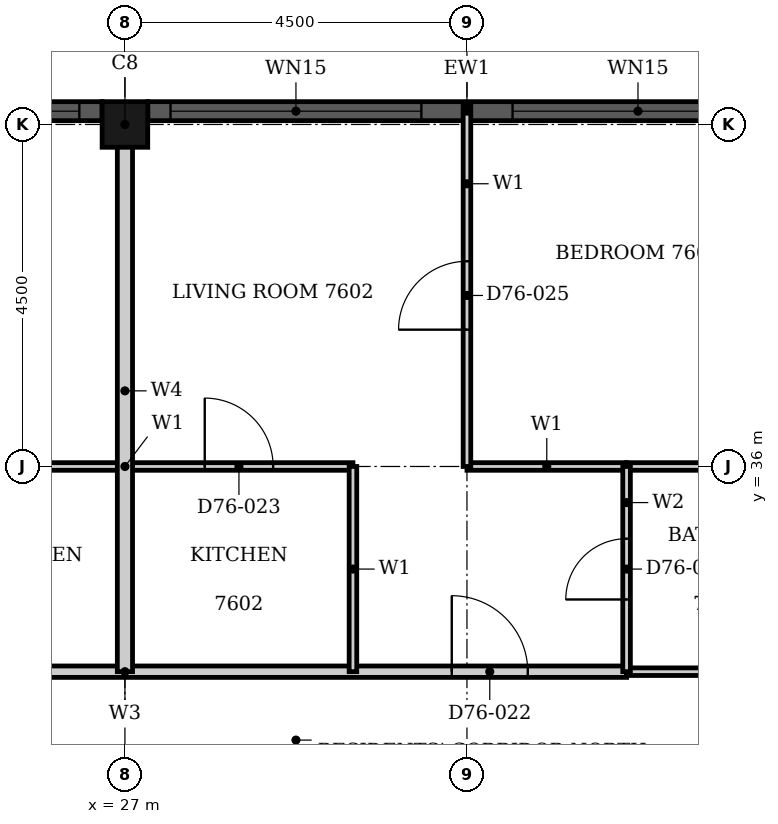
"""IFC4 building model, lengths in metres.
Left out: names, types, materials, properties, quantities, classifications, styles, units other than length and angle.
Written with IfcOpenShell. Run it as: python <this file> out.ifc"""

import sys

from ifc_helpers import new_model, si_unit, direction, frame, frame_2d, origin, origin_2d, place, context, subcontext, project, spatial, rectangle, hollow_rectangle, extrude, element, fill, save


model = new_model("IFC4")
c1 = context("Model", 3, precision=1e-05, world=origin(), true_north=direction((0.0, 1.0)))
c2 = subcontext(c1, "Body", "Model", "MODEL_VIEW")
j1 = project(units=[si_unit("LENGTHUNIT", "METRE"), si_unit("PLANEANGLEUNIT", "RADIAN")], contexts=[c1])
p1 = place(None, origin())
s1 = spatial("IfcSite", under=j1, at=p1, CompositionType="ELEMENT")
p2 = place(p1, origin())
s2 = spatial("IfcBuilding", under=s1, at=p2, CompositionType="ELEMENT")
p3 = place(p2, frame((0.0, 0.0, 298.2)))
s3 = spatial("IfcBuildingStorey", under=s2, at=p3, CompositionType="ELEMENT", Elevation=298.2)
p4 = place(p3, frame((27.0, 40.5, 0.0), z_axis=(0.0, 0.0, 1.0), x_axis=(1.0, 0.0, 0.0)))
e1 = element("IfcColumn", 1, at=p4, inside=s3, PredefinedType="COLUMN", context=c2, shape_type="SweptSolid", body=[
    extrude(hollow_rectangle(XDim=0.6, YDim=0.6, WallThickness=0.02, at=origin_2d()), origin(), (0.0, 0.0, 1.0), 3.7),
])
p5 = place(p3, frame((35.7, 40.675, 0.0), z_axis=(0.0, 0.0, 1.0), x_axis=(-1.0, 0.0, 0.0)))
e2 = element("IfcWall", 2, at=p5, inside=s3, PredefinedType="SOLIDWALL", context=c2, shape_type="SweptSolid", body=[
    extrude(rectangle(XDim=8.4, YDim=0.25, at=frame_2d((4.2, 0.0))), origin(), (0.0, 0.0, 1.0), 3.7),
])
p6 = place(p5, frame((0.3, 0.0, 0.45)))
e3 = element("IfcOpeningElement", 3, at=p6, cuts=e2, PredefinedType="OPENING", context=c2, shape_type="SweptSolid", body=[
    extrude(rectangle(XDim=3.3, YDim=2.3, at=frame_2d((1.65, 1.15))), frame((0.0, 0.135, 0.0), z_axis=(0.0, -1.0, 0.0), x_axis=(1.0, 0.0, 0.0)), (0.0, 0.0, 1.0), 0.27),
])
p7 = place(p5, frame((4.8, 0.0, 0.45)))
e4 = element("IfcOpeningElement", 4, at=p7, cuts=e2, PredefinedType="OPENING", context=c2, shape_type="SweptSolid", body=[
    extrude(rectangle(XDim=3.3, YDim=2.3, at=frame_2d((1.65, 1.15))), frame((0.0, 0.135, 0.0), z_axis=(0.0, -1.0, 0.0), x_axis=(1.0, 0.0, 0.0)), (0.0, 0.0, 1.0), 0.27),
])
p8 = place(p3, frame((26.7, 40.675, 0.0), z_axis=(0.0, 0.0, 1.0), x_axis=(-1.0, 0.0, 0.0)))
e5 = element("IfcWall", 5, at=p8, inside=s3, PredefinedType="SOLIDWALL", context=c2, shape_type="SweptSolid", body=[
    extrude(rectangle(XDim=8.4, YDim=0.25, at=frame_2d((4.2, 0.0))), origin(), (0.0, 0.0, 1.0), 3.7),
])
p9 = place(p8, frame((0.3, 0.0, 0.45)))
e6 = element("IfcOpeningElement", 6, at=p9, cuts=e5, PredefinedType="OPENING", context=c2, shape_type="SweptSolid", body=[
    extrude(rectangle(XDim=3.3, YDim=2.3, at=frame_2d((1.65, 1.15))), frame((0.0, 0.135, 0.0), z_axis=(0.0, -1.0, 0.0), x_axis=(1.0, 0.0, 0.0)), (0.0, 0.0, 1.0), 0.27),
])
p10 = place(p8, frame((4.8, 0.0, 0.45)))
e7 = element("IfcOpeningElement", 7, at=p10, cuts=e5, PredefinedType="OPENING", context=c2, shape_type="SweptSolid", body=[
    extrude(rectangle(XDim=3.3, YDim=2.3, at=frame_2d((1.65, 1.15))), frame((0.0, 0.135, 0.0), z_axis=(0.0, -1.0, 0.0), x_axis=(1.0, 0.0, 0.0)), (0.0, 0.0, 1.0), 0.27),
])
p11 = place(p3, frame((20.4, 33.3, 0.0), z_axis=(0.0, 0.0, 1.0), x_axis=(1.0, 0.0, 0.0)))
e8 = element("IfcWall", 8, at=p11, inside=s3, PredefinedType="PARTITIONING", context=c2, shape_type="SweptSolid", body=[
    extrude(rectangle(XDim=13.2, YDim=0.15, at=frame_2d((6.6, 0.0))), origin(), (0.0, 0.0, 1.0), 3.4),
])
p12 = place(p11, frame((1.3, 0.0, 0.0)))
e9 = element("IfcOpeningElement", 9, at=p12, cuts=e8, PredefinedType="OPENING", context=c2, shape_type="SweptSolid", body=[
    extrude(rectangle(XDim=1.0, YDim=2.2, at=frame_2d((0.5, 1.1))), frame((0.0, 0.085, 0.0), z_axis=(0.0, -1.0, 0.0), x_axis=(1.0, 0.0, 0.0)), (0.0, 0.0, 1.0), 0.17),
])
p13 = place(p11, frame((10.9, 0.0, 0.0)))
e10 = element("IfcOpeningElement", 10, at=p13, cuts=e8, PredefinedType="OPENING", context=c2, shape_type="SweptSolid", body=[
    extrude(rectangle(XDim=1.0, YDim=2.2, at=frame_2d((0.5, 1.1))), frame((0.0, 0.085, 0.0), z_axis=(0.0, -1.0, 0.0), x_axis=(1.0, 0.0, 0.0)), (0.0, 0.0, 1.0), 0.17),
])
p14 = place(p3, frame((24.0, 36.0, 0.0), z_axis=(0.0, 0.0, 1.0), x_axis=(1.0, 0.0, 0.0)))
e11 = element("IfcWall", 11, at=p14, inside=s3, PredefinedType="PARTITIONING", context=c2, shape_type="SweptSolid", body=[
    extrude(rectangle(XDim=6.0, YDim=0.1, at=frame_2d((3.0, 0.0))), origin(), (0.0, 0.0, 1.0), 3.4),
])
p15 = place(p14, frame((1.05, 0.0, 0.0)))
e12 = element("IfcOpeningElement", 12, at=p15, cuts=e11, PredefinedType="OPENING", context=c2, shape_type="SweptSolid", body=[
    extrude(rectangle(XDim=0.9, YDim=2.1, at=frame_2d((0.45, 1.05))), frame((0.0, 0.06, 0.0), z_axis=(0.0, -1.0, 0.0), x_axis=(1.0, 0.0, 0.0)), (0.0, 0.0, 1.0), 0.12),
])
p16 = place(p14, frame((4.05, 0.0, 0.0)))
e13 = element("IfcOpeningElement", 13, at=p16, cuts=e11, PredefinedType="OPENING", context=c2, shape_type="SweptSolid", body=[
    extrude(rectangle(XDim=0.9, YDim=2.1, at=frame_2d((0.45, 1.05))), frame((0.0, 0.06, 0.0), z_axis=(0.0, -1.0, 0.0), x_axis=(1.0, 0.0, 0.0)), (0.0, 0.0, 1.0), 0.12),
])
p17 = place(p3, frame((31.5, 36.0, 0.0), z_axis=(0.0, 0.0, 1.0), x_axis=(1.0, 0.0, 0.0)))
e14 = element("IfcWall", 14, at=p17, inside=s3, PredefinedType="PARTITIONING", context=c2, shape_type="SweptSolid", body=[
    extrude(rectangle(XDim=2.1, YDim=0.1, at=frame_2d((1.05, 0.0))), origin(), (0.0, 0.0, 1.0), 3.4),
])
p18 = place(p3, frame((30.0, 33.3, 0.0), z_axis=(0.0, 0.0, 1.0), x_axis=(0.0, 1.0, 0.0)))
e15 = element("IfcWall", 15, at=p18, inside=s3, PredefinedType="PARTITIONING", context=c2, shape_type="SweptSolid", body=[
    extrude(rectangle(XDim=2.7, YDim=0.1, at=frame_2d((1.35, 0.0))), origin(), (0.0, 0.0, 1.0), 3.4),
])
p19 = place(p3, frame((31.5, 36.0, 0.0), z_axis=(0.0, 0.0, 1.0), x_axis=(0.0, 1.0, 0.0)))
e16 = element("IfcWall", 16, at=p19, inside=s3, PredefinedType="PARTITIONING", context=c2, shape_type="SweptSolid", body=[
    extrude(rectangle(XDim=4.74, YDim=0.1, at=frame_2d((2.37, 0.0))), origin(), (0.0, 0.0, 1.0), 3.4),
])
p20 = place(p19, frame((1.8, 0.0, 0.0)))
e17 = element("IfcOpeningElement", 17, at=p20, cuts=e16, PredefinedType="OPENING", context=c2, shape_type="SweptSolid", body=[
    extrude(rectangle(XDim=0.9, YDim=2.1, at=frame_2d((0.45, 1.05))), frame((0.0, 0.06, 0.0), z_axis=(0.0, -1.0, 0.0), x_axis=(1.0, 0.0, 0.0)), (0.0, 0.0, 1.0), 0.12),
])
p21 = place(p3, frame((27.0, 33.3, 0.0), z_axis=(0.0, 0.0, 1.0), x_axis=(0.0, 1.0, 0.0)))
e18 = element("IfcWall", 18, at=p21, inside=s3, PredefinedType="PARTITIONING", context=c2, shape_type="SweptSolid", body=[
    extrude(rectangle(XDim=7.39, YDim=0.2, at=frame_2d((3.695, 0.0))), origin(), (0.0, 0.0, 1.0), 3.4),
])
for number, where, z_axis, x_axis in (
    (19, (33.6, 33.3, 0.0), (0.0, 0.0, 1.0), (1.0, 0.0, 0.0)),
    (20, (33.6, 36.0, 0.0), (0.0, 0.0, 1.0), (1.0, 0.0, 0.0)),
):
    element("IfcWall", number, at=place(p3, frame(where, z_axis=z_axis, x_axis=x_axis)), inside=s3, PredefinedType="PARTITIONING", context=c2, shape_type="SweptSolid", body=[
        extrude(rectangle(XDim=4.8, YDim=0.1, at=frame_2d((2.4, 0.0))), origin(), (0.0, 0.0, 1.0), 3.4),
    ])
p22 = place(p3, frame((33.6, 33.3, 0.0), z_axis=(0.0, 0.0, 1.0), x_axis=(0.0, 1.0, 0.0)))
e21 = element("IfcWall", 21, at=p22, inside=s3, PredefinedType="PARTITIONING", context=c2, shape_type="SweptSolid", body=[
    extrude(rectangle(XDim=2.7, YDim=0.1, at=frame_2d((1.35, 0.0))), origin(), (0.0, 0.0, 1.0), 3.4),
])
p23 = place(p22, frame((0.95, 0.0, 0.0)))
e22 = element("IfcOpeningElement", 22, at=p23, cuts=e21, PredefinedType="OPENING", context=c2, shape_type="SweptSolid", body=[
    extrude(rectangle(XDim=0.8, YDim=2.1, at=frame_2d((0.4, 1.05))), frame((0.0, 0.06, 0.0), z_axis=(0.0, -1.0, 0.0), x_axis=(1.0, 0.0, 0.0)), (0.0, 0.0, 1.0), 0.12),
])
p24 = place(p6, origin())
e23 = element("IfcWindow", 23, at=p24, inside=s3, PartitioningType="SINGLE_PANEL", PredefinedType="WINDOW", context=c2, shape_type="SweptSolid", body=[
    extrude(rectangle(XDim=3.3, YDim=2.3, at=frame_2d((1.65, 1.15))), frame((0.0, 0.03, 0.0), z_axis=(0.0, -1.0, 0.0), x_axis=(1.0, 0.0, 0.0)), (0.0, 0.0, 1.0), 0.06),
])
fill(e3, e23)
p25 = place(p7, origin())
e24 = element("IfcWindow", 24, at=p25, inside=s3, PartitioningType="SINGLE_PANEL", PredefinedType="WINDOW", context=c2, shape_type="SweptSolid", body=[
    extrude(rectangle(XDim=3.3, YDim=2.3, at=frame_2d((1.65, 1.15))), frame((0.0, 0.03, 0.0), z_axis=(0.0, -1.0, 0.0), x_axis=(1.0, 0.0, 0.0)), (0.0, 0.0, 1.0), 0.06),
])
fill(e4, e24)
p26 = place(p9, origin())
e25 = element("IfcWindow", 25, at=p26, inside=s3, PartitioningType="SINGLE_PANEL", PredefinedType="WINDOW", context=c2, shape_type="SweptSolid", body=[
    extrude(rectangle(XDim=3.3, YDim=2.3, at=frame_2d((1.65, 1.15))), frame((0.0, 0.03, 0.0), z_axis=(0.0, -1.0, 0.0), x_axis=(1.0, 0.0, 0.0)), (0.0, 0.0, 1.0), 0.06),
])
fill(e6, e25)
p27 = place(p13, origin())
e26 = element("IfcDoor", 26, at=p27, inside=s3, OperationType="SINGLE_SWING_RIGHT", PredefinedType="DOOR", context=c2, shape_type="SweptSolid", body=[
    extrude(rectangle(XDim=1.0, YDim=2.2, at=frame_2d((0.5, 1.1))), frame((0.0, 0.025, 0.0), z_axis=(0.0, -1.0, 0.0), x_axis=(1.0, 0.0, 0.0)), (0.0, 0.0, 1.0), 0.05),
])
fill(e10, e26)
p28 = place(p16, origin())
e27 = element("IfcDoor", 27, at=p28, inside=s3, OperationType="SINGLE_SWING_RIGHT", PredefinedType="DOOR", context=c2, shape_type="SweptSolid", body=[
    extrude(rectangle(XDim=0.9, YDim=2.1, at=frame_2d((0.45, 1.05))), frame((0.0, 0.025, 0.0), z_axis=(0.0, -1.0, 0.0), x_axis=(1.0, 0.0, 0.0)), (0.0, 0.0, 1.0), 0.05),
])
fill(e13, e27)
p29 = place(p23, origin())
e28 = element("IfcDoor", 28, at=p29, inside=s3, OperationType="SINGLE_SWING_LEFT", PredefinedType="DOOR", context=c2, shape_type="SweptSolid", body=[
    extrude(rectangle(XDim=0.8, YDim=2.1, at=frame_2d((0.4, 1.05))), frame((0.0, 0.025, 0.0), z_axis=(0.0, -1.0, 0.0), x_axis=(1.0, 0.0, 0.0)), (0.0, 0.0, 1.0), 0.05),
])
fill(e22, e28)
p30 = place(p20, origin())
e29 = element("IfcDoor", 29, at=p30, inside=s3, OperationType="SINGLE_SWING_RIGHT", PredefinedType="DOOR", context=c2, shape_type="SweptSolid", body=[
    extrude(rectangle(XDim=0.9, YDim=2.1, at=frame_2d((0.45, 1.05))), frame((0.0, 0.025, 0.0), z_axis=(0.0, -1.0, 0.0), x_axis=(1.0, 0.0, 0.0)), (0.0, 0.0, 1.0), 0.05),
])
fill(e17, e29)
save(model, sys.argv[1])
